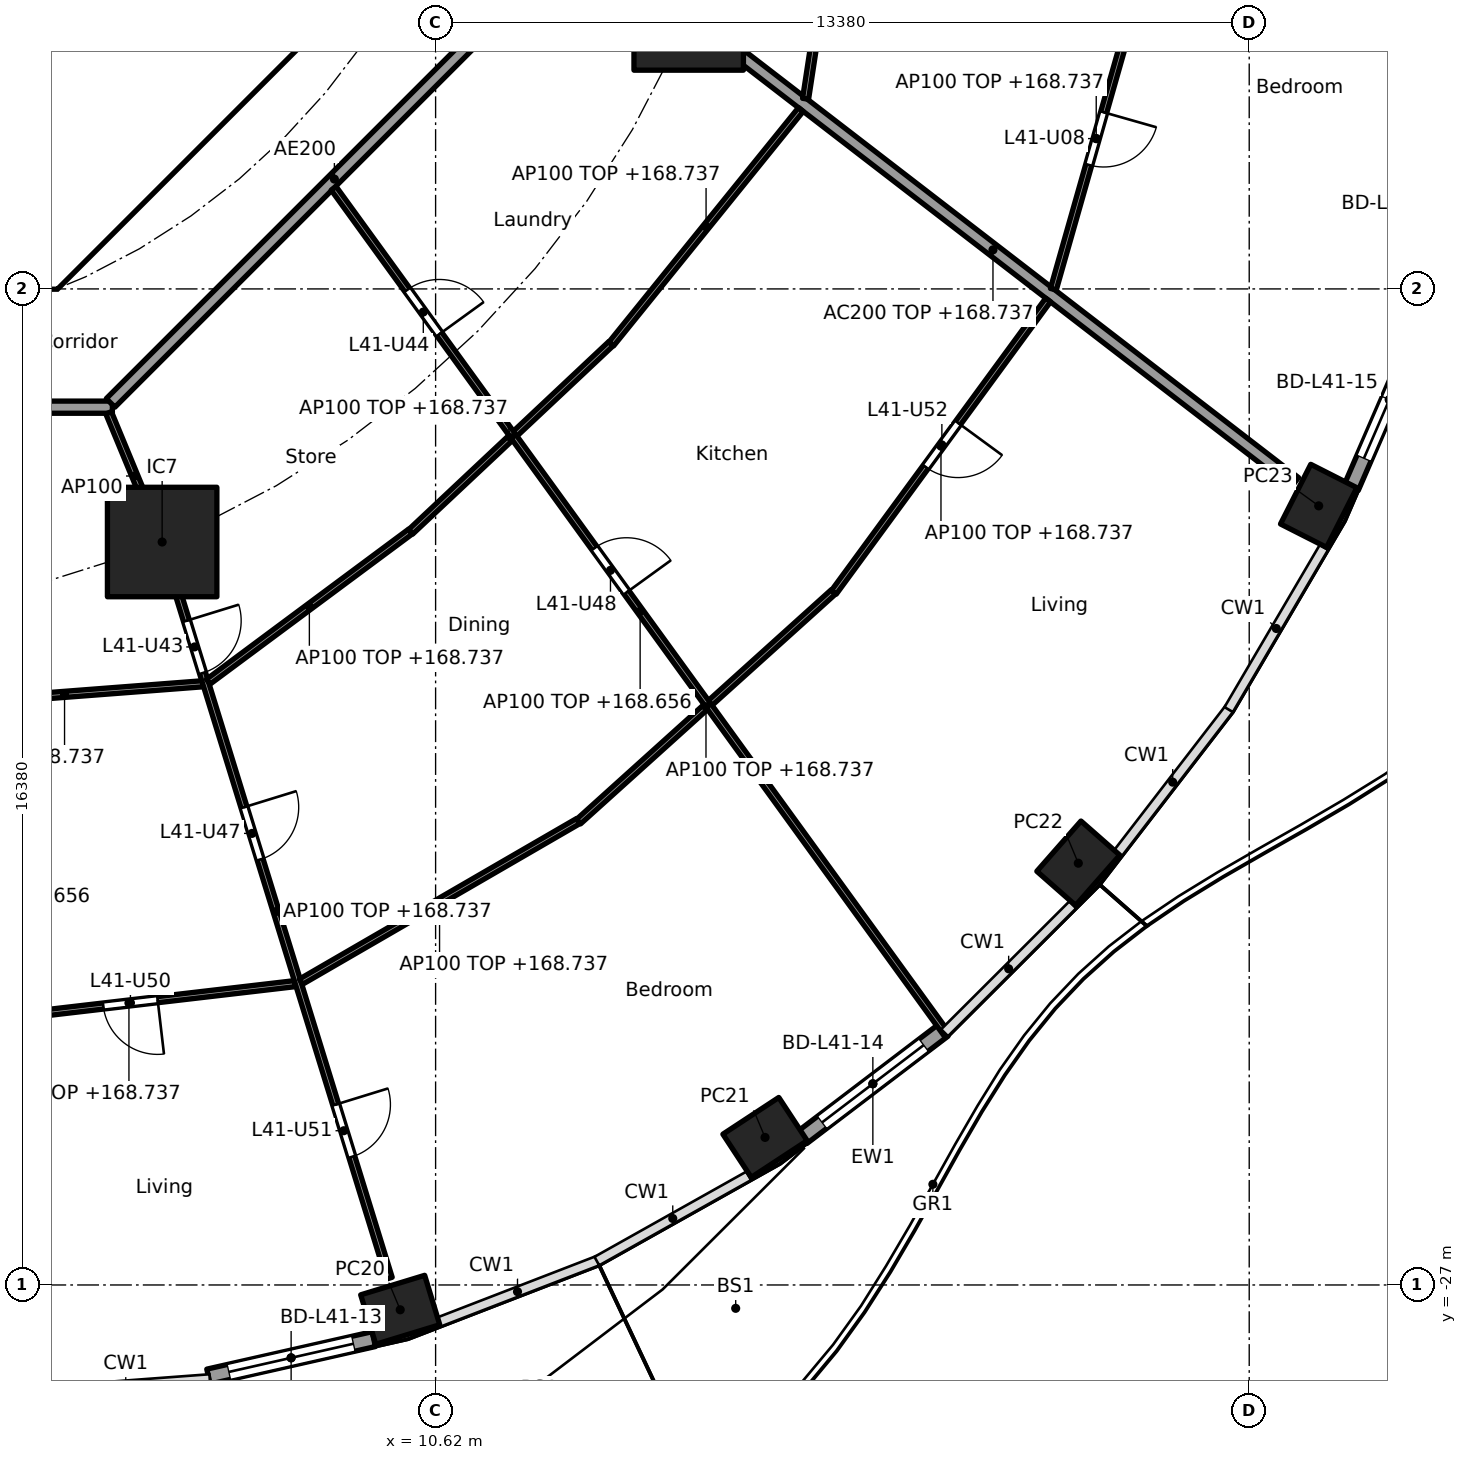
"""IFC4 building model, lengths in metres.
Left out: names, types, materials, properties, quantities, classifications, styles, units other than length and angle.
Written with IfcOpenShell. Run it as: python <this file> out.ifc"""

import sys

from ifc_helpers import new_model, si_unit, direction, frame, frame_2d, origin, origin_2d, place, context, subcontext, project, spatial, polyline, rectangle, hollow_rectangle, outline, extrude, element, fill, save


model = new_model("IFC4")
c1 = context("Model", 3, precision=1e-05, world=origin(), true_north=direction((0.0, 1.0)))
c2 = subcontext(c1, "Body", "Model", "MODEL_VIEW")
j1 = project(units=[si_unit("LENGTHUNIT", "METRE"), si_unit("PLANEANGLEUNIT", "RADIAN")], contexts=[c1])
p1 = place(None, origin())
s1 = spatial("IfcSite", under=j1, at=p1, CompositionType="ELEMENT")
p2 = place(p1, origin())
s2 = spatial("IfcBuilding", under=s1, at=p2, CompositionType="ELEMENT")
p3 = place(p2, frame((0.0, 0.0, 165.9)))
s3 = spatial("IfcBuildingStorey", under=s2, at=p3, CompositionType="ELEMENT", Elevation=165.9)
for number, where, z_axis, x_axis in (
    (1, (10.038, -27.408, -0.26), (0.0, 0.0, 1.0), (0.957, 0.292, 0.0)),
    (2, (16.038, -24.573, -0.26), (0.0, 0.0, 1.0), (0.836, 0.549, 0.0)),
    (3, (21.189, -20.064, -0.26), (0.0, 0.0, 1.0), (0.66, 0.751, 0.0)),
    (4, (25.142, -14.188, -0.26), (0.0, 0.0, 1.0), (0.452, 0.892, 0.0)),
):
    element("IfcColumn", number, at=place(p3, frame(where, z_axis=z_axis, x_axis=x_axis)), inside=s3, PredefinedType="COLUMN", context=c2, shape_type="SweptSolid", body=[
        extrude(hollow_rectangle(XDim=1.1, YDim=0.85, WallThickness=0.036, at=origin_2d()), origin(), (0.0, 0.0, 1.0), 3.96),
    ])
for number, where, z_axis, x_axis in (
    (5, (6.123, -14.782, 0.0), (0.0, 0.0, 1.0), (1.0, 0.0, 0.0)),
    (6, (14.782, -6.123, 0.0), (0.0, 0.0, 1.0), (1.0, 0.0, 0.0)),
):
    element("IfcColumn", number, at=place(p3, frame(where, z_axis=z_axis, x_axis=x_axis)), inside=s3, PredefinedType="COLUMN", context=c2, shape_type="SweptSolid", body=[
        extrude(rectangle(XDim=1.8, YDim=1.8, at=origin_2d()), origin(), (0.0, 0.0, 1.0), 3.7),
    ])
p4 = place(p3, frame((9.604, -27.891, 0.0), z_axis=(0.0, 0.0, 1.0), x_axis=(-0.975324329911, -0.220776926974, 0.0)))
e7 = element("IfcWall", 7, at=p4, inside=s3, PredefinedType="SOLIDWALL", context=c2, shape_type="SweptSolid", body=[
    extrude(rectangle(XDim=2.788, YDim=0.25, at=frame_2d((1.394, 0.0))), origin(), (0.0, 0.0, 1.0), 3.44),
])
p5 = place(p4, frame((0.344, 0.0, 0.0)))
e8 = element("IfcOpeningElement", 8, at=p5, cuts=e7, PredefinedType="OPENING", context=c2, shape_type="SweptSolid", body=[
    extrude(rectangle(XDim=2.1, YDim=2.4, at=frame_2d((1.05, 1.2))), frame((0.0, 0.135, 0.0), z_axis=(0.0, -1.0, 0.0), x_axis=(1.0, 0.0, 0.0)), (0.0, 0.0, 1.0), 0.27),
])
p6 = place(p3, frame((18.972, -22.809, 0.0), z_axis=(0.0, 0.0, 1.0), x_axis=(-0.796055733703, -0.60522332146, 0.0)))
e9 = element("IfcWall", 9, at=p6, inside=s3, PredefinedType="SOLIDWALL", context=c2, shape_type="SweptSolid", body=[
    extrude(rectangle(XDim=2.917, YDim=0.25, at=frame_2d((1.458, 0.0))), origin(), (0.0, 0.0, 1.0), 3.44),
])
p7 = place(p6, frame((0.408, 0.0, 0.0)))
e10 = element("IfcOpeningElement", 10, at=p7, cuts=e9, PredefinedType="OPENING", context=c2, shape_type="SweptSolid", body=[
    extrude(rectangle(XDim=2.1, YDim=2.4, at=frame_2d((1.05, 1.2))), frame((0.0, 0.135, 0.0), z_axis=(0.0, -1.0, 0.0), x_axis=(1.0, 0.0, 0.0)), (0.0, 0.0, 1.0), 0.27),
])
p8 = place(p3, frame((26.929, -11.0, 0.0), z_axis=(0.0, 0.0, 1.0), x_axis=(-0.397620521824, -0.917549955384, 0.0)))
e11 = element("IfcWall", 11, at=p8, inside=s3, PredefinedType="SOLIDWALL", context=c2, shape_type="SweptSolid", body=[
    extrude(rectangle(XDim=3.142, YDim=0.25, at=frame_2d((1.571, 0.0))), origin(), (0.0, 0.0, 1.0), 3.44),
])
p9 = place(p8, frame((0.521, 0.0, 0.0)))
e12 = element("IfcOpeningElement", 12, at=p9, cuts=e11, PredefinedType="OPENING", context=c2, shape_type="SweptSolid", body=[
    extrude(rectangle(XDim=2.1, YDim=2.4, at=frame_2d((1.05, 1.2))), frame((0.0, 0.135, 0.0), z_axis=(0.0, -1.0, 0.0), x_axis=(1.0, 0.0, 0.0)), (0.0, 0.0, 1.0), 0.27),
])
p10 = place(p3, frame((4.613, -9.988, 0.0), z_axis=(0.0, 0.0, 1.0), x_axis=(0.707106781187, 0.707106781187, 0.0)))
e13 = element("IfcWall", 13, at=p10, inside=s3, PredefinedType="SHEAR", context=c2, shape_type="SweptSolid", body=[
    extrude(rectangle(XDim=7.602, YDim=0.6, at=frame_2d((3.801, 0.0))), origin(), (0.0, 0.0, 1.0), 3.44),
])
p11 = place(p10, frame((3.201, 0.0, 0.0)))
e14 = element("IfcOpeningElement", 14, at=p11, cuts=e13, PredefinedType="OPENING", context=c2, shape_type="SweptSolid", body=[
    extrude(rectangle(XDim=1.2, YDim=2.1, at=frame_2d((0.6, 1.05))), frame((0.0, 0.31, 0.0), z_axis=(0.0, -1.0, 0.0), x_axis=(1.0, 0.0, 0.0)), (0.0, 0.0, 1.0), 0.62),
])
p12 = place(p3, origin())
e15 = element("IfcWall", 15, at=p12, inside=s3, PredefinedType="SHEAR", context=c2, shape_type="SweptSolid", body=[
    extrude(outline(polyline([(-4.152, -10.025), (4.152, -10.025), (4.401, -9.776), (4.825, -10.2), (4.401, -10.625), (-4.401, -10.625), (-4.825, -10.2), (-4.401, -9.776), (-4.152, -10.025)])), origin(), (0.0, 0.0, 1.0), 3.44),
])
p13 = place(p3, frame((14.822, -6.154, 0.0), z_axis=(0.0, 0.0, 1.0), x_axis=(0.792203056092, -0.610257583254, 0.0)))
e16 = element("IfcWall", 16, at=p13, inside=s3, PredefinedType="PARTITIONING", context=c2, shape_type="SweptSolid", body=[
    extrude(rectangle(XDim=12.533, YDim=0.2, at=frame_2d((6.266, 0.0))), origin(), (0.0, 0.0, 1.0), 2.837),
])
p14 = place(p3, frame((-5.104, -12.565, 0.0), z_axis=(0.0, 0.0, 1.0), x_axis=(1.0, 0.0, 0.0)))
e17 = element("IfcWall", 17, at=p14, inside=s3, PredefinedType="PARTITIONING", context=c2, shape_type="SweptSolid", body=[
    extrude(rectangle(XDim=10.409, YDim=0.2, at=frame_2d((5.205, 0.0))), origin(), (0.0, 0.0, 1.0), 3.44),
])
p15 = place(p14, frame((2.87, 0.0, 0.0)))
e18 = element("IfcOpeningElement", 18, at=p15, cuts=e17, PredefinedType="OPENING", context=c2, shape_type="SweptSolid", body=[
    extrude(rectangle(XDim=1.0, YDim=2.1, at=frame_2d((0.5, 1.05))), frame((0.0, 0.11, 0.0), z_axis=(0.0, -1.0, 0.0), x_axis=(1.0, 0.0, 0.0)), (0.0, 0.0, 1.0), 0.22),
])
p16 = place(p3, frame((5.275, -12.494, 0.0), z_axis=(0.0, 0.0, 1.0), x_axis=(0.707106781187, 0.707106781187, 0.0)))
e19 = element("IfcWall", 19, at=p16, inside=s3, PredefinedType="PARTITIONING", context=c2, shape_type="SweptSolid", body=[
    extrude(rectangle(XDim=10.409, YDim=0.2, at=frame_2d((5.205, 0.0))), origin(), (0.0, 0.0, 1.0), 3.44),
])
p17 = place(p3, frame((2.245, -17.462, 0.0), z_axis=(0.0, 0.0, 1.0), x_axis=(0.997077117727, 0.07640171009, 0.0)))
e20 = element("IfcWall", 20, at=p17, inside=s3, PredefinedType="PARTITIONING", context=c2, shape_type="SweptSolid", body=[
    extrude(rectangle(XDim=4.56, YDim=0.1, at=frame_2d((2.28, 0.0))), origin(), (0.0, 0.0, 1.0), 2.837),
])
p18 = place(p3, frame((2.842, -22.683, 0.0), z_axis=(0.0, 0.0, 1.0), x_axis=(0.993248590259, 0.116005335864, 0.0)))
e21 = element("IfcWall", 21, at=p18, inside=s3, PredefinedType="PARTITIONING", context=c2, shape_type="SweptSolid", body=[
    extrude(rectangle(XDim=5.508, YDim=0.1, at=frame_2d((2.754, 0.0))), origin(), (0.0, 0.0, 1.0), 2.837),
])
p19 = place(p18, frame((2.329, 0.0, 0.0)))
e22 = element("IfcOpeningElement", 22, at=p19, cuts=e21, PredefinedType="OPENING", context=c2, shape_type="SweptSolid", body=[
    extrude(rectangle(XDim=0.9, YDim=2.1, at=frame_2d((0.45, 1.05))), frame((0.0, 0.06, 0.0), z_axis=(0.0, -1.0, 0.0), x_axis=(1.0, 0.0, 0.0)), (0.0, 0.0, 1.0), 0.12),
])
p20 = place(p3, frame((5.243, -12.657, 0.0), z_axis=(0.0, 0.0, 1.0), x_axis=(0.382719158442, -0.923864733477, 0.0)))
e23 = element("IfcWall", 23, at=p20, inside=s3, PredefinedType="PARTITIONING", context=c2, shape_type="SweptSolid", body=[
    extrude(rectangle(XDim=2.25, YDim=0.1, at=frame_2d((1.125, 0.0))), origin(), (0.0, 0.0, 1.0), 3.44),
])
p21 = place(p3, frame((6.138, -14.83, 0.0), z_axis=(0.0, 0.0, 1.0), x_axis=(0.294818517221, -0.955553264818, 0.0)))
e24 = element("IfcWall", 24, at=p21, inside=s3, PredefinedType="PARTITIONING", context=c2, shape_type="SweptSolid", body=[
    extrude(rectangle(XDim=12.619, YDim=0.1, at=frame_2d((6.31, 0.0))), origin(), (0.0, 0.0, 1.0), 2.837),
])
p22 = place(p21, frame((1.306, 0.0, 0.0)))
e25 = element("IfcOpeningElement", 25, at=p22, cuts=e24, PredefinedType="OPENING", context=c2, shape_type="SweptSolid", body=[
    extrude(rectangle(XDim=0.9, YDim=2.1, at=frame_2d((0.45, 1.05))), frame((0.0, 0.06, 0.0), z_axis=(0.0, -1.0, 0.0), x_axis=(1.0, 0.0, 0.0)), (0.0, 0.0, 1.0), 0.12),
])
p23 = place(p21, frame((4.515, 0.0, 0.0)))
e26 = element("IfcOpeningElement", 26, at=p23, cuts=e24, PredefinedType="OPENING", context=c2, shape_type="SweptSolid", body=[
    extrude(rectangle(XDim=0.9, YDim=2.1, at=frame_2d((0.45, 1.05))), frame((0.0, 0.06, 0.0), z_axis=(0.0, -1.0, 0.0), x_axis=(1.0, 0.0, 0.0)), (0.0, 0.0, 1.0), 0.12),
])
p24 = place(p21, frame((9.632, 0.0, 0.0)))
e27 = element("IfcOpeningElement", 27, at=p24, cuts=e24, PredefinedType="OPENING", context=c2, shape_type="SweptSolid", body=[
    extrude(rectangle(XDim=0.9, YDim=2.1, at=frame_2d((0.45, 1.05))), frame((0.0, 0.06, 0.0), z_axis=(0.0, -1.0, 0.0), x_axis=(1.0, 0.0, 0.0)), (0.0, 0.0, 1.0), 0.12),
])
p25 = place(p3, frame((6.881, -17.08, 0.0), z_axis=(0.0, 0.0, 1.0), x_axis=(0.802784956441, 0.596268659005, 0.0)))
e28 = element("IfcWall", 28, at=p25, inside=s3, PredefinedType="PARTITIONING", context=c2, shape_type="SweptSolid", body=[
    extrude(rectangle(XDim=4.142, YDim=0.1, at=frame_2d((2.071, 0.0))), origin(), (0.0, 0.0, 1.0), 2.837),
])
p26 = place(p3, frame((8.405, -22.013, 0.0), z_axis=(0.0, 0.0, 1.0), x_axis=(0.865277177388, 0.501293732547, 0.0)))
e29 = element("IfcWall", 29, at=p26, inside=s3, PredefinedType="PARTITIONING", context=c2, shape_type="SweptSolid", body=[
    extrude(rectangle(XDim=5.27, YDim=0.1, at=frame_2d((2.635, 0.0))), origin(), (0.0, 0.0, 1.0), 2.837),
])
p27 = place(p3, frame((10.21, -14.614, 0.0), z_axis=(0.0, 0.0, 1.0), x_axis=(0.728883199496, 0.684638066055, 0.0)))
e30 = element("IfcWall", 30, at=p27, inside=s3, PredefinedType="PARTITIONING", context=c2, shape_type="SweptSolid", body=[
    extrude(rectangle(XDim=4.519, YDim=0.1, at=frame_2d((2.26, 0.0))), origin(), (0.0, 0.0, 1.0), 2.837),
])
p28 = place(p3, frame((12.971, -19.38, 0.0), z_axis=(0.0, 0.0, 1.0), x_axis=(0.742768881471, 0.669547898748, 0.0)))
e31 = element("IfcWall", 31, at=p28, inside=s3, PredefinedType="PARTITIONING", context=c2, shape_type="SweptSolid", body=[
    extrude(rectangle(XDim=5.642, YDim=0.1, at=frame_2d((2.821, 0.0))), origin(), (0.0, 0.0, 1.0), 2.837),
])
p29 = place(p3, frame((8.943, -8.966, 0.0), z_axis=(0.0, 0.0, 1.0), x_axis=(0.586803608919, -0.809729290912, 0.0)))
e32 = element("IfcWall", 32, at=p29, inside=s3, PredefinedType="PARTITIONING", context=c2, shape_type="SweptSolid", body=[
    extrude(rectangle(XDim=17.179, YDim=0.1, at=frame_2d((8.589, 0.0))), origin(), (0.0, 0.0, 1.0), 2.756),
])
p30 = place(p29, frame((2.062, 0.0, 0.0)))
e33 = element("IfcOpeningElement", 33, at=p30, cuts=e32, PredefinedType="OPENING", context=c2, shape_type="SweptSolid", body=[
    extrude(rectangle(XDim=0.9, YDim=2.1, at=frame_2d((0.45, 1.05))), frame((0.0, 0.06, 0.0), z_axis=(0.0, -1.0, 0.0), x_axis=(1.0, 0.0, 0.0)), (0.0, 0.0, 1.0), 0.12),
])
p31 = place(p29, frame((7.308, 0.0, 0.0)))
e34 = element("IfcOpeningElement", 34, at=p31, cuts=e32, PredefinedType="OPENING", context=c2, shape_type="SweptSolid", body=[
    extrude(rectangle(XDim=0.9, YDim=2.1, at=frame_2d((0.45, 1.05))), frame((0.0, 0.06, 0.0), z_axis=(0.0, -1.0, 0.0), x_axis=(1.0, 0.0, 0.0)), (0.0, 0.0, 1.0), 0.12),
])
p32 = place(p3, frame((13.509, -11.525, 0.0), z_axis=(0.0, 0.0, 1.0), x_axis=(0.628764602857, 0.777595700987, 0.0)))
e35 = element("IfcWall", 35, at=p32, inside=s3, PredefinedType="PARTITIONING", context=c2, shape_type="SweptSolid", body=[
    extrude(rectangle(XDim=4.957, YDim=0.1, at=frame_2d((2.479, 0.0))), origin(), (0.0, 0.0, 1.0), 2.837),
])
p33 = place(p3, frame((17.169, -15.609, 0.0), z_axis=(0.0, 0.0, 1.0), x_axis=(0.591122127251, 0.806582066918, 0.0)))
e36 = element("IfcWall", 36, at=p33, inside=s3, PredefinedType="PARTITIONING", context=c2, shape_type="SweptSolid", body=[
    extrude(rectangle(XDim=5.96, YDim=0.1, at=frame_2d((2.98, 0.0))), origin(), (0.0, 0.0, 1.0), 2.837),
])
p34 = place(p33, frame((2.555, 0.0, 0.0)))
e37 = element("IfcOpeningElement", 37, at=p34, cuts=e36, PredefinedType="OPENING", context=c2, shape_type="SweptSolid", body=[
    extrude(rectangle(XDim=0.9, YDim=2.1, at=frame_2d((0.45, 1.05))), frame((0.0, 0.06, 0.0), z_axis=(0.0, -1.0, 0.0), x_axis=(1.0, 0.0, 0.0)), (0.0, 0.0, 1.0), 0.12),
])
p35 = place(p3, frame((16.704, -7.493, 0.0), z_axis=(0.0, 0.0, 1.0), x_axis=(0.1510806336, 0.988521442434, 0.0)))
e38 = element("IfcWall", 38, at=p35, inside=s3, PredefinedType="PARTITIONING", context=c2, shape_type="SweptSolid", body=[
    extrude(rectangle(XDim=3.419, YDim=0.1, at=frame_2d((1.71, 0.0))), origin(), (0.0, 0.0, 1.0), 2.837),
])
p36 = place(p3, frame((20.779, -10.625, 0.0), z_axis=(0.0, 0.0, 1.0), x_axis=(0.273819702124, 0.961781040949, 0.0)))
e39 = element("IfcWall", 39, at=p36, inside=s3, PredefinedType="PARTITIONING", context=c2, shape_type="SweptSolid", body=[
    extrude(rectangle(XDim=5.152, YDim=0.1, at=frame_2d((2.576, 0.0))), origin(), (0.0, 0.0, 1.0), 2.837),
])
p37 = place(p36, frame((2.126, 0.0, 0.0)))
e40 = element("IfcOpeningElement", 40, at=p37, cuts=e39, PredefinedType="OPENING", context=c2, shape_type="SweptSolid", body=[
    extrude(rectangle(XDim=0.9, YDim=2.1, at=frame_2d((0.45, 1.05))), frame((0.0, 0.06, 0.0), z_axis=(0.0, -1.0, 0.0), x_axis=(1.0, 0.0, 0.0)), (0.0, 0.0, 1.0), 0.12),
])
p38 = place(p5, origin())
e41 = element("IfcDoor", 41, at=p38, inside=s3, OperationType="SLIDING_TO_LEFT", PredefinedType="DOOR", context=c2, shape_type="SweptSolid", body=[
    extrude(rectangle(XDim=2.1, YDim=2.4, at=frame_2d((1.05, 1.2))), frame((0.0, 0.025, 0.0), z_axis=(0.0, -1.0, 0.0), x_axis=(1.0, 0.0, 0.0)), (0.0, 0.0, 1.0), 0.05),
])
fill(e8, e41)
p39 = place(p7, origin())
e42 = element("IfcDoor", 42, at=p39, inside=s3, OperationType="SLIDING_TO_LEFT", PredefinedType="DOOR", context=c2, shape_type="SweptSolid", body=[
    extrude(rectangle(XDim=2.1, YDim=2.4, at=frame_2d((1.05, 1.2))), frame((0.0, 0.025, 0.0), z_axis=(0.0, -1.0, 0.0), x_axis=(1.0, 0.0, 0.0)), (0.0, 0.0, 1.0), 0.05),
])
fill(e10, e42)
p40 = place(p9, origin())
e43 = element("IfcDoor", 43, at=p40, inside=s3, OperationType="SLIDING_TO_LEFT", PredefinedType="DOOR", context=c2, shape_type="SweptSolid", body=[
    extrude(rectangle(XDim=2.1, YDim=2.4, at=frame_2d((1.05, 1.2))), frame((0.0, 0.025, 0.0), z_axis=(0.0, -1.0, 0.0), x_axis=(1.0, 0.0, 0.0)), (0.0, 0.0, 1.0), 0.05),
])
fill(e12, e43)
p41 = place(p11, origin())
e44 = element("IfcDoor", 44, at=p41, inside=s3, OperationType="SINGLE_SWING_LEFT", PredefinedType="DOOR", context=c2, shape_type="SweptSolid", body=[
    extrude(rectangle(XDim=1.2, YDim=2.1, at=frame_2d((0.6, 1.05))), frame((0.0, 0.025, 0.0), z_axis=(0.0, -1.0, 0.0), x_axis=(1.0, 0.0, 0.0)), (0.0, 0.0, 1.0), 0.05),
])
fill(e14, e44)
p42 = place(p37, frame((0.9, 0.0, 0.0), x_axis=(-1.0, 0.0, 0.0)))
e45 = element("IfcDoor", 45, at=p42, inside=s3, OperationType="SINGLE_SWING_LEFT", PredefinedType="DOOR", context=c2, shape_type="SweptSolid", body=[
    extrude(rectangle(XDim=0.9, YDim=2.1, at=frame_2d((0.45, 1.05))), frame((0.0, 0.025, 0.0), z_axis=(0.0, -1.0, 0.0), x_axis=(1.0, 0.0, 0.0)), (0.0, 0.0, 1.0), 0.05),
])
fill(e40, e45)
p43 = place(p22, origin())
e46 = element("IfcDoor", 46, at=p43, inside=s3, OperationType="SINGLE_SWING_LEFT", PredefinedType="DOOR", context=c2, shape_type="SweptSolid", body=[
    extrude(rectangle(XDim=0.9, YDim=2.1, at=frame_2d((0.45, 1.05))), frame((0.0, 0.025, 0.0), z_axis=(0.0, -1.0, 0.0), x_axis=(1.0, 0.0, 0.0)), (0.0, 0.0, 1.0), 0.05),
])
fill(e25, e46)
p44 = place(p30, origin())
e47 = element("IfcDoor", 47, at=p44, inside=s3, OperationType="SINGLE_SWING_RIGHT", PredefinedType="DOOR", context=c2, shape_type="SweptSolid", body=[
    extrude(rectangle(XDim=0.9, YDim=2.1, at=frame_2d((0.45, 1.05))), frame((0.0, 0.025, 0.0), z_axis=(0.0, -1.0, 0.0), x_axis=(1.0, 0.0, 0.0)), (0.0, 0.0, 1.0), 0.05),
])
fill(e33, e47)
p45 = place(p23, origin())
e48 = element("IfcDoor", 48, at=p45, inside=s3, OperationType="SINGLE_SWING_LEFT", PredefinedType="DOOR", context=c2, shape_type="SweptSolid", body=[
    extrude(rectangle(XDim=0.9, YDim=2.1, at=frame_2d((0.45, 1.05))), frame((0.0, 0.025, 0.0), z_axis=(0.0, -1.0, 0.0), x_axis=(1.0, 0.0, 0.0)), (0.0, 0.0, 1.0), 0.05),
])
fill(e26, e48)
p46 = place(p31, origin())
e49 = element("IfcDoor", 49, at=p46, inside=s3, OperationType="SINGLE_SWING_RIGHT", PredefinedType="DOOR", context=c2, shape_type="SweptSolid", body=[
    extrude(rectangle(XDim=0.9, YDim=2.1, at=frame_2d((0.45, 1.05))), frame((0.0, 0.025, 0.0), z_axis=(0.0, -1.0, 0.0), x_axis=(1.0, 0.0, 0.0)), (0.0, 0.0, 1.0), 0.05),
])
fill(e34, e49)
p47 = place(p19, frame((0.9, 0.0, 0.0), x_axis=(-1.0, 0.0, 0.0)))
e50 = element("IfcDoor", 50, at=p47, inside=s3, OperationType="SINGLE_SWING_LEFT", PredefinedType="DOOR", context=c2, shape_type="SweptSolid", body=[
    extrude(rectangle(XDim=0.9, YDim=2.1, at=frame_2d((0.45, 1.05))), frame((0.0, 0.025, 0.0), z_axis=(0.0, -1.0, 0.0), x_axis=(1.0, 0.0, 0.0)), (0.0, 0.0, 1.0), 0.05),
])
fill(e22, e50)
p48 = place(p24, origin())
e51 = element("IfcDoor", 51, at=p48, inside=s3, OperationType="SINGLE_SWING_LEFT", PredefinedType="DOOR", context=c2, shape_type="SweptSolid", body=[
    extrude(rectangle(XDim=0.9, YDim=2.1, at=frame_2d((0.45, 1.05))), frame((0.0, 0.025, 0.0), z_axis=(0.0, -1.0, 0.0), x_axis=(1.0, 0.0, 0.0)), (0.0, 0.0, 1.0), 0.05),
])
fill(e27, e51)
p49 = place(p34, frame((0.9, 0.0, 0.0), x_axis=(-1.0, 0.0, 0.0)))
e52 = element("IfcDoor", 52, at=p49, inside=s3, OperationType="SINGLE_SWING_LEFT", PredefinedType="DOOR", context=c2, shape_type="SweptSolid", body=[
    extrude(rectangle(XDim=0.9, YDim=2.1, at=frame_2d((0.45, 1.05))), frame((0.0, 0.025, 0.0), z_axis=(0.0, -1.0, 0.0), x_axis=(1.0, 0.0, 0.0)), (0.0, 0.0, 1.0), 0.05),
])
fill(e37, e52)
save(model, sys.argv[1])
